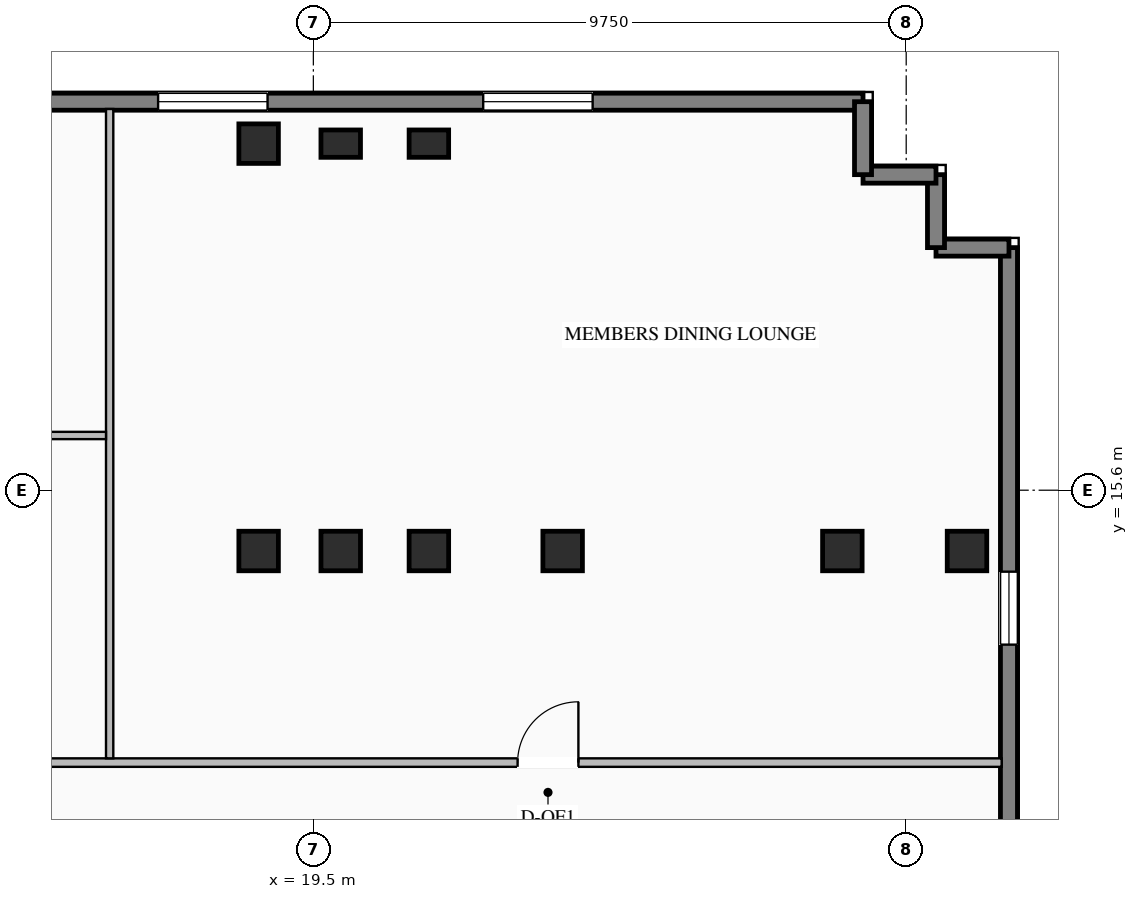
"""IFC4 building model, lengths in metres.
Left out: names, types, materials, properties, quantities, classifications, styles, units other than length and angle.
Written with IfcOpenShell. Run it as: python <this file> out.ifc"""

import sys

from ifc_helpers import new_model, si_unit, direction, frame, frame_2d, origin, origin_2d, place, context, subcontext, project, spatial, rectangle, i_section, extrude, element, fill, save


model = new_model("IFC4")
c1 = context("Model", 3, precision=1e-05, world=origin(), true_north=direction((0.0, 1.0)))
c2 = subcontext(c1, "Body", "Model", "MODEL_VIEW")
j1 = project(units=[si_unit("LENGTHUNIT", "METRE"), si_unit("PLANEANGLEUNIT", "RADIAN")], contexts=[c1])
p1 = place(None, origin())
s1 = spatial("IfcSite", under=j1, at=p1, CompositionType="ELEMENT")
p2 = place(p1, origin())
s2 = spatial("IfcBuilding", under=s1, at=p2, CompositionType="ELEMENT")
p3 = place(p2, frame((0.0, 0.0, 141.55)))
s3 = spatial("IfcBuildingStorey", under=s2, at=p3, CompositionType="ELEMENT", Elevation=141.55)
for number, where, z_axis, x_axis in (
    (1, (18.6, 14.6, 0.0), (0.0, 0.0, 1.0), (1.0, 0.0, 0.0)),
    (2, (19.95, 14.6, 0.0), (0.0, 0.0, 1.0), (1.0, 0.0, 0.0)),
    (3, (21.4, 14.6, 0.0), (0.0, 0.0, 1.0), (1.0, 0.0, 0.0)),
    (4, (23.6, 14.6, 0.0), (0.0, 0.0, 1.0), (1.0, 0.0, 0.0)),
    (5, (28.2, 14.6, 0.0), (0.0, 0.0, 1.0), (1.0, 0.0, 0.0)),
    (6, (18.6, 21.3, 0.0), (0.0, 0.0, 1.0), (1.0, 0.0, 0.0)),
    (7, (30.25, 14.6, 0.0), (0.0, 0.0, 1.0), (1.0, 0.0, 0.0)),
):
    element("IfcColumn", number, at=place(p3, frame(where, z_axis=z_axis, x_axis=x_axis)), inside=s3, PredefinedType="COLUMN", context=c2, shape_type="SweptSolid", body=[
        extrude(i_section(OverallWidth=0.65, OverallDepth=0.65, WebThickness=0.028, FlangeThickness=0.04, at=origin_2d()), origin(), (0.0, 0.0, 1.0), 3.45),
    ])
for number, where, z_axis, x_axis in (
    (8, (19.95, 21.3, 0.0), (0.0, 0.0, 1.0), (1.0, 0.0, 0.0)),
    (9, (21.4, 21.3, 0.0), (0.0, 0.0, 1.0), (1.0, 0.0, 0.0)),
):
    element("IfcColumn", number, at=place(p3, frame(where, z_axis=z_axis, x_axis=x_axis)), inside=s3, PredefinedType="PILASTER", context=c2, shape_type="SweptSolid", body=[
        extrude(rectangle(XDim=0.65, YDim=0.45, at=origin_2d()), origin(), (0.0, 0.0, 1.0), 3.45),
    ])
p4 = place(p3, frame((12.5, 21.99, 0.0), z_axis=(0.0, 0.0, 1.0), x_axis=(1.0, 0.0, 0.0)))
e10 = element("IfcWall", 10, at=p4, inside=s3, PredefinedType="STANDARD", context=c2, shape_type="SweptSolid", body=[
    extrude(rectangle(XDim=16.04, YDim=0.28, at=frame_2d((8.02, 0.0))), origin(), (0.0, 0.0, 1.0), 3.25),
])
p5 = place(p4, frame((4.447, 0.0, 0.76)))
e11 = element("IfcOpeningElement", 11, at=p5, cuts=e10, PredefinedType="OPENING", context=c2, shape_type="SweptSolid", body=[
    extrude(rectangle(XDim=1.8, YDim=1.95, at=frame_2d((0.9, 0.975))), frame((0.0, 0.15, 0.0), z_axis=(0.0, -1.0, 0.0), x_axis=(1.0, 0.0, 0.0)), (0.0, 0.0, 1.0), 0.3),
])
p6 = place(p4, frame((9.793, 0.0, 0.76)))
e12 = element("IfcOpeningElement", 12, at=p6, cuts=e10, PredefinedType="OPENING", context=c2, shape_type="SweptSolid", body=[
    extrude(rectangle(XDim=1.8, YDim=1.95, at=frame_2d((0.9, 0.975))), frame((0.0, 0.15, 0.0), z_axis=(0.0, -1.0, 0.0), x_axis=(1.0, 0.0, 0.0)), (0.0, 0.0, 1.0), 0.3),
])
p7 = place(p3, frame((30.94, 19.59, 0.0), z_axis=(0.0, 0.0, 1.0), x_axis=(0.0, -1.0, 0.0)))
e13 = element("IfcWall", 13, at=p7, inside=s3, PredefinedType="STANDARD", context=c2, shape_type="SweptSolid", body=[
    extrude(rectangle(XDim=17.79, YDim=0.28, at=frame_2d((8.895, 0.0))), origin(), (0.0, 0.0, 1.0), 3.25),
])
p8 = place(p7, frame((5.33, 0.0, 0.76)))
e14 = element("IfcOpeningElement", 14, at=p8, cuts=e13, PredefinedType="OPENING", context=c2, shape_type="SweptSolid", body=[
    extrude(rectangle(XDim=1.2, YDim=1.95, at=frame_2d((0.6, 0.975))), frame((0.0, 0.15, 0.0), z_axis=(0.0, -1.0, 0.0), x_axis=(1.0, 0.0, 0.0)), (0.0, 0.0, 1.0), 0.3),
])
p9 = place(p7, frame((11.26, 0.0, 0.76)))
e15 = element("IfcOpeningElement", 15, at=p9, cuts=e13, PredefinedType="OPENING", context=c2, shape_type="SweptSolid", body=[
    extrude(rectangle(XDim=1.2, YDim=1.95, at=frame_2d((0.6, 0.975))), frame((0.0, 0.15, 0.0), z_axis=(0.0, -1.0, 0.0), x_axis=(1.0, 0.0, 0.0)), (0.0, 0.0, 1.0), 0.3),
])
for number, where, z_axis, x_axis in (
    (16, (30.94, 19.59, 0.0), (0.0, 0.0, 1.0), (-1.0, 0.0, 0.0)),
    (17, (29.74, 19.59, 0.0), (0.0, 0.0, 1.0), (0.0, 1.0, 0.0)),
    (18, (29.74, 20.79, 0.0), (0.0, 0.0, 1.0), (-1.0, 0.0, 0.0)),
    (19, (28.54, 20.79, 0.0), (0.0, 0.0, 1.0), (0.0, 1.0, 0.0)),
):
    element("IfcWall", number, at=place(p3, frame(where, z_axis=z_axis, x_axis=x_axis)), inside=s3, PredefinedType="STANDARD", context=c2, shape_type="SweptSolid", body=[
        extrude(rectangle(XDim=1.2, YDim=0.28, at=frame_2d((0.6, 0.0))), origin(), (0.0, 0.0, 1.0), 3.25),
    ])
p10 = place(p3, frame((-32.82, 11.12, 0.0), z_axis=(0.0, 0.0, 1.0), x_axis=(1.0, 0.0, 0.0)))
e20 = element("IfcWall", 20, at=p10, inside=s3, PredefinedType="STANDARD", context=c2, shape_type="SweptSolid", body=[
    extrude(rectangle(XDim=63.64, YDim=0.14, at=frame_2d((31.82, 0.0))), origin(), (0.0, 0.0, 1.0), 3.25),
])
p11 = place(p10, frame((6.961, 0.0, 0.0)))
e21 = element("IfcOpeningElement", 21, at=p11, cuts=e20, PredefinedType="OPENING", context=c2, shape_type="SweptSolid", body=[
    extrude(rectangle(XDim=1.0, YDim=2.08, at=frame_2d((0.5, 1.04))), frame((0.0, 0.08, 0.0), z_axis=(0.0, -1.0, 0.0), x_axis=(1.0, 0.0, 0.0)), (0.0, 0.0, 1.0), 0.16),
])
p12 = place(p10, frame((22.745, 0.0, 0.0)))
e22 = element("IfcOpeningElement", 22, at=p12, cuts=e20, PredefinedType="OPENING", context=c2, shape_type="SweptSolid", body=[
    extrude(rectangle(XDim=1.0, YDim=2.08, at=frame_2d((0.5, 1.04))), frame((0.0, 0.08, 0.0), z_axis=(0.0, -1.0, 0.0), x_axis=(1.0, 0.0, 0.0)), (0.0, 0.0, 1.0), 0.16),
])
p13 = place(p10, frame((39.895, 0.0, 0.0)))
e23 = element("IfcOpeningElement", 23, at=p13, cuts=e20, PredefinedType="OPENING", context=c2, shape_type="SweptSolid", body=[
    extrude(rectangle(XDim=1.0, YDim=2.08, at=frame_2d((0.5, 1.04))), frame((0.0, 0.08, 0.0), z_axis=(0.0, -1.0, 0.0), x_axis=(1.0, 0.0, 0.0)), (0.0, 0.0, 1.0), 0.16),
])
p14 = place(p10, frame((55.679, 0.0, 0.0)))
e24 = element("IfcOpeningElement", 24, at=p14, cuts=e20, PredefinedType="OPENING", context=c2, shape_type="SweptSolid", body=[
    extrude(rectangle(XDim=1.0, YDim=2.08, at=frame_2d((0.5, 1.04))), frame((0.0, 0.08, 0.0), z_axis=(0.0, -1.0, 0.0), x_axis=(1.0, 0.0, 0.0)), (0.0, 0.0, 1.0), 0.16),
])
p15 = place(p3, frame((16.15, 11.19, 0.0), z_axis=(0.0, 0.0, 1.0), x_axis=(0.0, 1.0, 0.0)))
e25 = element("IfcWall", 25, at=p15, inside=s3, PredefinedType="STANDARD", context=c2, shape_type="SweptSolid", body=[
    extrude(rectangle(XDim=10.68, YDim=0.12, at=frame_2d((5.34, 0.0))), origin(), (0.0, 0.0, 1.0), 3.25),
])
p16 = place(p3, frame((-18.09, 16.5, 0.0), z_axis=(0.0, 0.0, 1.0), x_axis=(1.0, 0.0, 0.0)))
e26 = element("IfcWall", 26, at=p16, inside=s3, PredefinedType="STANDARD", context=c2, shape_type="SweptSolid", body=[
    extrude(rectangle(XDim=34.18, YDim=0.12, at=frame_2d((17.09, 0.0))), origin(), (0.0, 0.0, 1.0), 3.25),
])
p17 = place(p16, frame((0.32, 0.0, 0.0)))
e27 = element("IfcOpeningElement", 27, at=p17, cuts=e26, PredefinedType="OPENING", context=c2, shape_type="SweptSolid", body=[
    extrude(rectangle(XDim=1.0, YDim=2.08, at=frame_2d((0.5, 1.04))), frame((0.0, 0.07, 0.0), z_axis=(0.0, -1.0, 0.0), x_axis=(1.0, 0.0, 0.0)), (0.0, 0.0, 1.0), 0.14),
])
p18 = place(p16, frame((25.008, 0.0, 0.0)))
e28 = element("IfcOpeningElement", 28, at=p18, cuts=e26, PredefinedType="OPENING", context=c2, shape_type="SweptSolid", body=[
    extrude(rectangle(XDim=1.0, YDim=2.08, at=frame_2d((0.5, 1.04))), frame((0.0, 0.07, 0.0), z_axis=(0.0, -1.0, 0.0), x_axis=(1.0, 0.0, 0.0)), (0.0, 0.0, 1.0), 0.14),
])
p19 = place(p5, origin())
e29 = element("IfcWindow", 29, at=p19, inside=s3, PartitioningType="SINGLE_PANEL", PredefinedType="WINDOW", context=c2, shape_type="SweptSolid", body=[
    extrude(rectangle(XDim=1.8, YDim=1.95, at=frame_2d((0.9, 0.975))), frame((0.0, 0.03, 0.0), z_axis=(0.0, -1.0, 0.0), x_axis=(1.0, 0.0, 0.0)), (0.0, 0.0, 1.0), 0.06),
])
fill(e11, e29)
p20 = place(p6, origin())
e30 = element("IfcWindow", 30, at=p20, inside=s3, PartitioningType="SINGLE_PANEL", PredefinedType="WINDOW", context=c2, shape_type="SweptSolid", body=[
    extrude(rectangle(XDim=1.8, YDim=1.95, at=frame_2d((0.9, 0.975))), frame((0.0, 0.03, 0.0), z_axis=(0.0, -1.0, 0.0), x_axis=(1.0, 0.0, 0.0)), (0.0, 0.0, 1.0), 0.06),
])
fill(e12, e30)
p21 = place(p8, origin())
e31 = element("IfcWindow", 31, at=p21, inside=s3, PartitioningType="SINGLE_PANEL", PredefinedType="WINDOW", context=c2, shape_type="SweptSolid", body=[
    extrude(rectangle(XDim=1.2, YDim=1.95, at=frame_2d((0.6, 0.975))), frame((0.0, 0.03, 0.0), z_axis=(0.0, -1.0, 0.0), x_axis=(1.0, 0.0, 0.0)), (0.0, 0.0, 1.0), 0.06),
])
fill(e14, e31)
p22 = place(p14, origin())
e32 = element("IfcDoor", 32, at=p22, inside=s3, OperationType="SINGLE_SWING_RIGHT", PredefinedType="DOOR", context=c2, shape_type="SweptSolid", body=[
    extrude(rectangle(XDim=1.0, YDim=2.08, at=frame_2d((0.5, 1.04))), frame((0.0, 0.025, 0.0), z_axis=(0.0, -1.0, 0.0), x_axis=(1.0, 0.0, 0.0)), (0.0, 0.0, 1.0), 0.05),
])
fill(e24, e32)
save(model, sys.argv[1])
